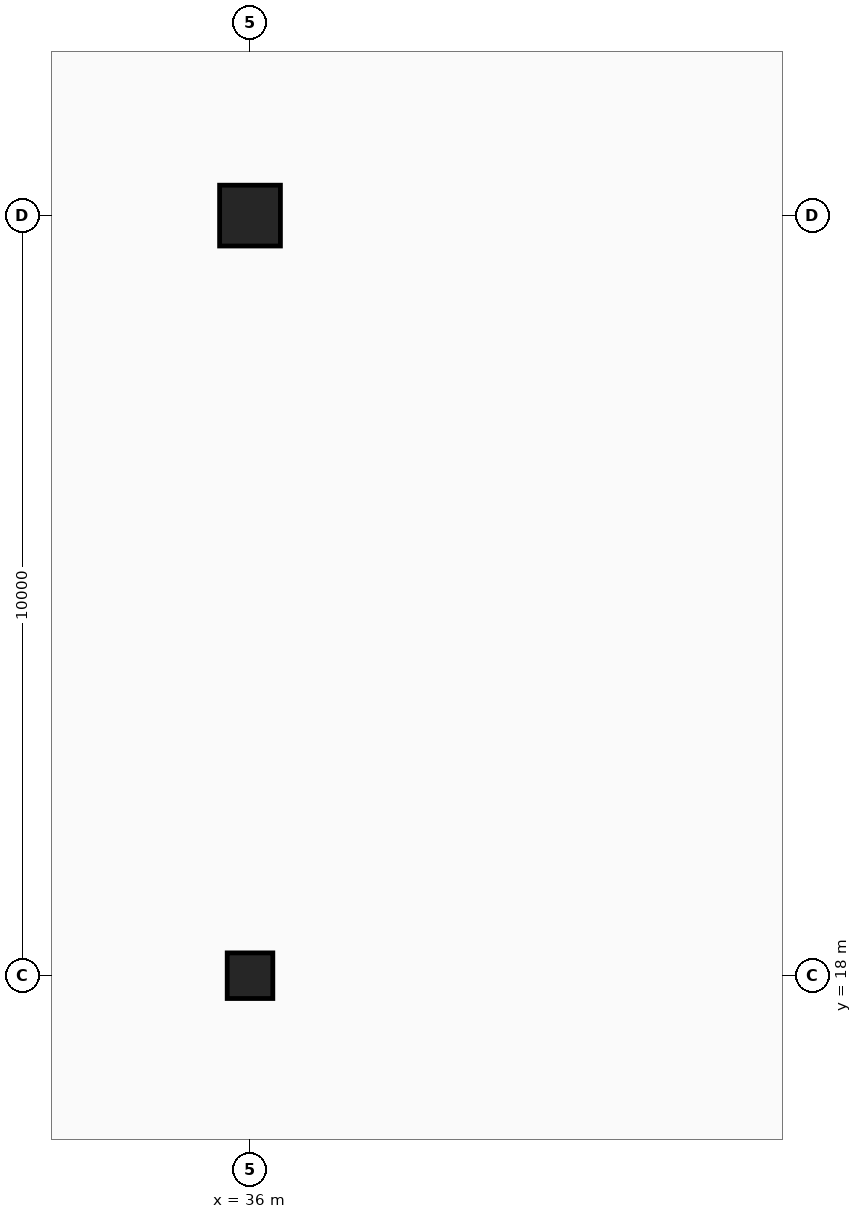
"""IFC4 building model, lengths in metres.
Left out: names, types, materials, properties, quantities, classifications, styles, units other than length and angle.
Written with IfcOpenShell. Run it as: python <this file> out.ifc"""

import sys

from ifc_helpers import new_model, si_unit, direction, frame, origin, origin_2d, place, context, subcontext, project, spatial, rectangle, extrude, element, save


model = new_model("IFC4")
c1 = context("Model", 3, precision=1e-05, world=origin(), true_north=direction((0.0, 1.0)))
c2 = subcontext(c1, "Body", "Model", "MODEL_VIEW")
j1 = project(units=[si_unit("LENGTHUNIT", "METRE"), si_unit("PLANEANGLEUNIT", "RADIAN")], contexts=[c1])
p1 = place(None, origin())
s1 = spatial("IfcSite", under=j1, at=p1, CompositionType="ELEMENT")
p2 = place(p1, origin())
s2 = spatial("IfcBuilding", under=s1, at=p2, CompositionType="ELEMENT")
p3 = place(p2, frame((0.0, 0.0, -5.1)))
s3 = spatial("IfcBuildingStorey", under=s2, at=p3, CompositionType="ELEMENT", Elevation=-5.1)
p4 = place(p3, frame((36.0, 18.0, 0.0), z_axis=(0.0, 0.0, 1.0), x_axis=(1.0, 0.0, 0.0)))
e1 = element("IfcColumn", 1, at=p4, inside=s3, PredefinedType="COLUMN", context=c2, shape_type="SweptSolid", body=[
    extrude(rectangle(XDim=0.6, YDim=0.6, at=origin_2d()), origin(), (0.0, 0.0, 1.0), 5.1),
])
p5 = place(p3, frame((36.0, 28.0, 0.0), z_axis=(0.0, 0.0, 1.0), x_axis=(1.0, 0.0, 0.0)))
e2 = element("IfcColumn", 2, at=p5, inside=s3, PredefinedType="COLUMN", context=c2, shape_type="SweptSolid", body=[
    extrude(rectangle(XDim=0.8, YDim=0.8, at=origin_2d()), origin(), (0.0, 0.0, 1.0), 5.1),
])
save(model, sys.argv[1])
